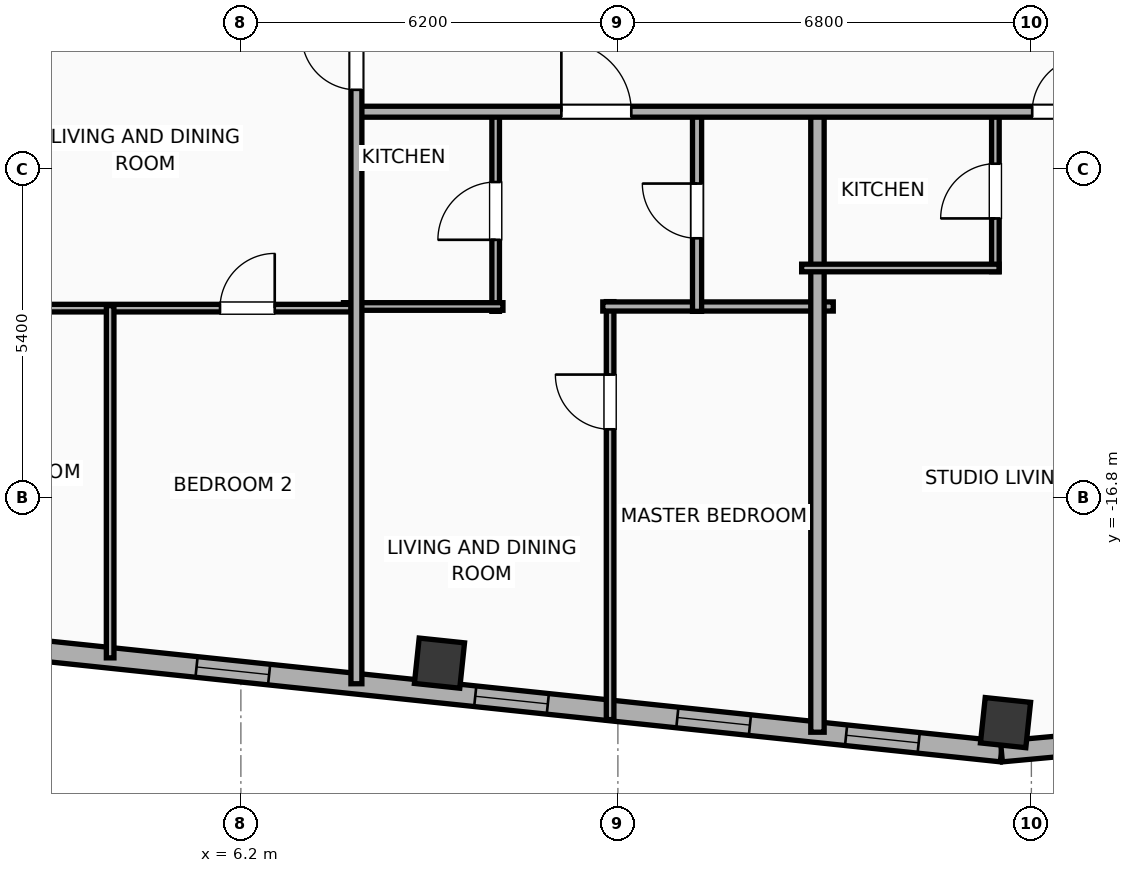
"""IFC4 building model, lengths in metres.
Left out: names, types, materials, properties, quantities, classifications, styles, units other than length and angle.
Written with IfcOpenShell. Run it as: python <this file> out.ifc"""

import sys

from ifc_helpers import new_model, si_unit, direction, frame, frame_2d, origin, origin_2d, place, context, subcontext, project, spatial, rectangle, hollow_rectangle, extrude, element, fill, save


model = new_model("IFC4")
c1 = context("Model", 3, precision=1e-05, world=origin(), true_north=direction((0.0, 1.0)))
c2 = subcontext(c1, "Body", "Model", "MODEL_VIEW")
j1 = project(units=[si_unit("LENGTHUNIT", "METRE"), si_unit("PLANEANGLEUNIT", "RADIAN")], contexts=[c1])
p1 = place(None, origin())
s1 = spatial("IfcSite", under=j1, at=p1, CompositionType="ELEMENT")
p2 = place(p1, origin())
s2 = spatial("IfcBuilding", under=s1, at=p2, CompositionType="ELEMENT")
p3 = place(p2, frame((0.0, 0.0, 302.9)))
s3 = spatial("IfcBuildingStorey", under=s2, at=p3, CompositionType="ELEMENT", Elevation=302.9)
for number, where, z_axis, x_axis in (
    (1, (9.466, -19.518, 0.0), (0.0, 0.0, 1.0), (0.995, -0.105, 0.0)),
    (2, (18.775, -20.497, 0.0), (0.0, 0.0, 1.0), (0.995, -0.105, 0.0)),
):
    element("IfcColumn", number, at=place(p3, frame(where, z_axis=z_axis, x_axis=x_axis)), inside=s3, PredefinedType="COLUMN", context=c2, shape_type="SweptSolid", body=[
        extrude(hollow_rectangle(XDim=0.75, YDim=0.75, WallThickness=0.025, at=origin_2d()), origin(), (0.0, 0.0, 1.0), 3.9),
    ])
p4 = place(p3, frame((18.708, -20.972, 0.0), z_axis=(0.0, 0.0, 1.0), x_axis=(-0.994521888554, 0.104528528102, 0.0)))
e3 = element("IfcWall", 3, at=p4, inside=s3, PredefinedType="ELEMENTEDWALL", context=c2, shape_type="SweptSolid", body=[
    extrude(rectangle(XDim=46.766, YDim=0.34, at=frame_2d((23.383, 0.0))), origin(), (0.0, 0.0, 1.0), 3.635),
])
p5 = place(p4, frame((23.733, 0.0, 0.65)))
e4 = element("IfcOpeningElement", 4, at=p5, cuts=e3, PredefinedType="OPENING", context=c2, shape_type="SweptSolid", body=[
    extrude(rectangle(XDim=2.6, YDim=2.45, at=frame_2d((1.3, 1.225))), frame((0.0, 0.18, 0.0), z_axis=(0.0, -1.0, 0.0), x_axis=(1.0, 0.0, 0.0)), (0.0, 0.0, 1.0), 0.36),
])
p6 = place(p4, frame((44.402, 0.0, 0.75)))
e5 = element("IfcOpeningElement", 5, at=p6, cuts=e3, PredefinedType="OPENING", context=c2, shape_type="SweptSolid", body=[
    extrude(rectangle(XDim=1.2, YDim=2.05, at=frame_2d((0.6, 1.025))), frame((0.0, 0.18, 0.0), z_axis=(0.0, -1.0, 0.0), x_axis=(1.0, 0.0, 0.0)), (0.0, 0.0, 1.0), 0.36),
])
p7 = place(p4, frame((39.54, 0.0, 0.75)))
e6 = element("IfcOpeningElement", 6, at=p7, cuts=e3, PredefinedType="OPENING", context=c2, shape_type="SweptSolid", body=[
    extrude(rectangle(XDim=1.2, YDim=2.05, at=frame_2d((0.6, 1.025))), frame((0.0, 0.18, 0.0), z_axis=(0.0, -1.0, 0.0), x_axis=(1.0, 0.0, 0.0)), (0.0, 0.0, 1.0), 0.36),
])
p8 = place(p4, frame((42.406, 0.0, 0.75)))
e7 = element("IfcOpeningElement", 7, at=p8, cuts=e3, PredefinedType="OPENING", context=c2, shape_type="SweptSolid", body=[
    extrude(rectangle(XDim=1.2, YDim=2.05, at=frame_2d((0.6, 1.025))), frame((0.0, 0.18, 0.0), z_axis=(0.0, -1.0, 0.0), x_axis=(1.0, 0.0, 0.0)), (0.0, 0.0, 1.0), 0.36),
])
p9 = place(p4, frame((34.933, 0.0, 0.75)))
e8 = element("IfcOpeningElement", 8, at=p9, cuts=e3, PredefinedType="OPENING", context=c2, shape_type="SweptSolid", body=[
    extrude(rectangle(XDim=1.2, YDim=2.05, at=frame_2d((0.6, 1.025))), frame((0.0, 0.18, 0.0), z_axis=(0.0, -1.0, 0.0), x_axis=(1.0, 0.0, 0.0)), (0.0, 0.0, 1.0), 0.36),
])
p10 = place(p4, frame((28.631, 0.0, 0.75)))
e9 = element("IfcOpeningElement", 9, at=p10, cuts=e3, PredefinedType="OPENING", context=c2, shape_type="SweptSolid", body=[
    extrude(rectangle(XDim=1.2, YDim=2.05, at=frame_2d((0.6, 1.025))), frame((0.0, 0.18, 0.0), z_axis=(0.0, -1.0, 0.0), x_axis=(1.0, 0.0, 0.0)), (0.0, 0.0, 1.0), 0.36),
])
p11 = place(p4, frame((30.896, 0.0, 0.75)))
e10 = element("IfcOpeningElement", 10, at=p11, cuts=e3, PredefinedType="OPENING", context=c2, shape_type="SweptSolid", body=[
    extrude(rectangle(XDim=1.2, YDim=2.05, at=frame_2d((0.6, 1.025))), frame((0.0, 0.18, 0.0), z_axis=(0.0, -1.0, 0.0), x_axis=(1.0, 0.0, 0.0)), (0.0, 0.0, 1.0), 0.36),
])
p12 = place(p4, frame((7.501, 0.0, 0.75)))
e11 = element("IfcOpeningElement", 11, at=p12, cuts=e3, PredefinedType="OPENING", context=c2, shape_type="SweptSolid", body=[
    extrude(rectangle(XDim=1.2, YDim=2.05, at=frame_2d((0.6, 1.025))), frame((0.0, 0.18, 0.0), z_axis=(0.0, -1.0, 0.0), x_axis=(1.0, 0.0, 0.0)), (0.0, 0.0, 1.0), 0.36),
])
p13 = place(p4, frame((4.159, 0.0, 0.75)))
e12 = element("IfcOpeningElement", 12, at=p13, cuts=e3, PredefinedType="OPENING", context=c2, shape_type="SweptSolid", body=[
    extrude(rectangle(XDim=1.2, YDim=2.05, at=frame_2d((0.6, 1.025))), frame((0.0, 0.18, 0.0), z_axis=(0.0, -1.0, 0.0), x_axis=(1.0, 0.0, 0.0)), (0.0, 0.0, 1.0), 0.36),
])
p14 = place(p4, frame((1.369, 0.0, 0.75)))
e13 = element("IfcOpeningElement", 13, at=p14, cuts=e3, PredefinedType="OPENING", context=c2, shape_type="SweptSolid", body=[
    extrude(rectangle(XDim=1.2, YDim=2.05, at=frame_2d((0.6, 1.025))), frame((0.0, 0.18, 0.0), z_axis=(0.0, -1.0, 0.0), x_axis=(1.0, 0.0, 0.0)), (0.0, 0.0, 1.0), 0.36),
])
p15 = place(p4, frame((20.254, 0.0, 0.75)))
e14 = element("IfcOpeningElement", 14, at=p15, cuts=e3, PredefinedType="OPENING", context=c2, shape_type="SweptSolid", body=[
    extrude(rectangle(XDim=1.2, YDim=2.05, at=frame_2d((0.6, 1.025))), frame((0.0, 0.18, 0.0), z_axis=(0.0, -1.0, 0.0), x_axis=(1.0, 0.0, 0.0)), (0.0, 0.0, 1.0), 0.36),
])
p16 = place(p4, frame((16.172, 0.0, 0.75)))
e15 = element("IfcOpeningElement", 15, at=p16, cuts=e3, PredefinedType="OPENING", context=c2, shape_type="SweptSolid", body=[
    extrude(rectangle(XDim=1.2, YDim=2.05, at=frame_2d((0.6, 1.025))), frame((0.0, 0.18, 0.0), z_axis=(0.0, -1.0, 0.0), x_axis=(1.0, 0.0, 0.0)), (0.0, 0.0, 1.0), 0.36),
])
p17 = place(p4, frame((12.11, 0.0, 0.75)))
e16 = element("IfcOpeningElement", 16, at=p17, cuts=e3, PredefinedType="OPENING", context=c2, shape_type="SweptSolid", body=[
    extrude(rectangle(XDim=1.2, YDim=2.05, at=frame_2d((0.6, 1.025))), frame((0.0, 0.18, 0.0), z_axis=(0.0, -1.0, 0.0), x_axis=(1.0, 0.0, 0.0)), (0.0, 0.0, 1.0), 0.36),
])
p18 = place(p3, frame((20.056, -20.848, 0.0), z_axis=(0.0, 0.0, 1.0), x_axis=(-0.995813013343, -0.091413579172, 0.0)))
e17 = element("IfcWall", 17, at=p18, inside=s3, PredefinedType="ELEMENTEDWALL", context=c2, shape_type="SweptSolid", body=[
    extrude(rectangle(XDim=1.354, YDim=0.34, at=frame_2d((0.677, 0.0))), origin(), (0.0, 0.0, 1.0), 3.635),
])
p19 = place(p3, frame((12.272, -20.447, 0.0), z_axis=(0.0, 0.0, 1.0), x_axis=(0.0, 1.0, 0.0)))
e18 = element("IfcWall", 18, at=p19, inside=s3, PredefinedType="PARTITIONING", context=c2, shape_type="SweptSolid", body=[
    extrude(rectangle(XDim=6.874, YDim=0.125, at=frame_2d((3.437, 0.0))), origin(), (0.0, 0.0, 1.0), 3.635),
])
p20 = place(p19, frame((4.774, 0.0, 0.0)))
e19 = element("IfcOpeningElement", 19, at=p20, cuts=e18, PredefinedType="OPENING", context=c2, shape_type="SweptSolid", body=[
    extrude(rectangle(XDim=0.9, YDim=2.05, at=frame_2d((0.45, 1.025))), frame((0.0, 0.073, 0.0), z_axis=(0.0, -1.0, 0.0), x_axis=(1.0, 0.0, 0.0)), (0.0, 0.0, 1.0), 0.145),
])
p21 = place(p3, frame((12.152, -13.653, 0.0), z_axis=(0.0, 0.0, 1.0), x_axis=(1.0, 0.0, 0.0)))
e20 = element("IfcWall", 20, at=p21, inside=s3, PredefinedType="PLUMBINGWALL", context=c2, shape_type="SweptSolid", body=[
    extrude(rectangle(XDim=3.79, YDim=0.15, at=frame_2d((1.895, 0.0))), origin(), (0.0, 0.0, 1.0), 3.635),
])
p22 = place(p3, frame((10.39, -13.733, 0.0), z_axis=(0.0, 0.0, 1.0), x_axis=(0.0, 1.0, 0.0)))
e21 = element("IfcWall", 21, at=p22, inside=s3, PredefinedType="PARTITIONING", context=c2, shape_type="SweptSolid", body=[
    extrude(rectangle(XDim=3.303, YDim=0.125, at=frame_2d((1.651, 0.0))), origin(), (0.0, 0.0, 1.0), 3.635),
])
p23 = place(p22, frame((1.177, 0.0, 0.0)))
e22 = element("IfcOpeningElement", 22, at=p23, cuts=e21, PredefinedType="OPENING", context=c2, shape_type="SweptSolid", body=[
    extrude(rectangle(XDim=0.95, YDim=2.05, at=frame_2d((0.475, 1.025))), frame((0.0, 0.073, 0.0), z_axis=(0.0, -1.0, 0.0), x_axis=(1.0, 0.0, 0.0)), (0.0, 0.0, 1.0), 0.145),
])
p24 = place(p3, frame((7.887, -13.653, 0.0), z_axis=(0.0, 0.0, 1.0), x_axis=(1.0, 0.0, 0.0)))
e23 = element("IfcWall", 23, at=p24, inside=s3, PredefinedType="PARTITIONING", context=c2, shape_type="SweptSolid", body=[
    extrude(rectangle(XDim=2.623, YDim=0.125, at=frame_2d((1.311, 0.0))), origin(), (0.0, 0.0, 1.0), 3.635),
])
p25 = place(p3, frame((13.702, -13.733, 0.0), z_axis=(0.0, 0.0, 1.0), x_axis=(0.0, 1.0, 0.0)))
e24 = element("IfcWall", 24, at=p25, inside=s3, PredefinedType="PLUMBINGWALL", context=c2, shape_type="SweptSolid", body=[
    extrude(rectangle(XDim=3.303, YDim=0.15, at=frame_2d((1.651, 0.0))), origin(), (0.0, 0.0, 1.0), 3.635),
])
p26 = place(p25, frame((1.201, 0.0, 0.0)))
e25 = element("IfcOpeningElement", 25, at=p26, cuts=e24, PredefinedType="OPENING", context=c2, shape_type="SweptSolid", body=[
    extrude(rectangle(XDim=0.9, YDim=2.05, at=frame_2d((0.45, 1.025))), frame((0.0, 0.085, 0.0), z_axis=(0.0, -1.0, 0.0), x_axis=(1.0, 0.0, 0.0)), (0.0, 0.0, 1.0), 0.17),
])
p27 = place(p3, frame((15.682, -20.654, 0.0), z_axis=(0.0, 0.0, 1.0), x_axis=(0.0, 1.0, 0.0)))
e26 = element("IfcWall", 26, at=p27, inside=s3, PredefinedType="PARTITIONING", context=c2, shape_type="SweptSolid", body=[
    extrude(rectangle(XDim=10.284, YDim=0.22, at=frame_2d((5.142, 0.0))), origin(), (0.0, 0.0, 1.0), 3.635),
])
p28 = place(p3, frame((18.608, -13.08, 0.0), z_axis=(0.0, 0.0, 1.0), x_axis=(0.0, 1.0, 0.0)))
e27 = element("IfcWall", 27, at=p28, inside=s3, PredefinedType="PARTITIONING", context=c2, shape_type="SweptSolid", body=[
    extrude(rectangle(XDim=2.65, YDim=0.125, at=frame_2d((1.325, 0.0))), origin(), (0.0, 0.0, 1.0), 3.635),
])
p29 = place(p28, frame((0.875, 0.0, 0.0)))
e28 = element("IfcOpeningElement", 28, at=p29, cuts=e27, PredefinedType="OPENING", context=c2, shape_type="SweptSolid", body=[
    extrude(rectangle(XDim=0.9, YDim=2.05, at=frame_2d((0.45, 1.025))), frame((0.0, 0.073, 0.0), z_axis=(0.0, -1.0, 0.0), x_axis=(1.0, 0.0, 0.0)), (0.0, 0.0, 1.0), 0.145),
])
p30 = place(p3, frame((15.422, -13.02, 0.0), z_axis=(0.0, 0.0, 1.0), x_axis=(1.0, 0.0, 0.0)))
e29 = element("IfcWall", 29, at=p30, inside=s3, PredefinedType="PARTITIONING", context=c2, shape_type="SweptSolid", body=[
    extrude(rectangle(XDim=3.246, YDim=0.125, at=frame_2d((1.623, 0.0))), origin(), (0.0, 0.0, 1.0), 3.635),
])
p31 = place(p3, frame((8.08, -10.45, 0.0), z_axis=(0.0, 0.0, 1.0), x_axis=(1.0, 0.0, 0.0)))
e30 = element("IfcWall", 30, at=p31, inside=s3, PredefinedType="PARTITIONING", context=c2, shape_type="SweptSolid", body=[
    extrude(rectangle(XDim=15.199, YDim=0.18, at=frame_2d((7.6, 0.0))), origin(), (0.0, 0.0, 1.0), 3.635),
])
p32 = place(p31, frame((3.39, 0.0, 0.0)))
e31 = element("IfcOpeningElement", 31, at=p32, cuts=e30, PredefinedType="OPENING", context=c2, shape_type="SweptSolid", body=[
    extrude(rectangle(XDim=1.15, YDim=2.05, at=frame_2d((0.575, 1.025))), frame((0.0, 0.1, 0.0), z_axis=(0.0, -1.0, 0.0), x_axis=(1.0, 0.0, 0.0)), (0.0, 0.0, 1.0), 0.2),
])
p33 = place(p31, frame((11.134, 0.0, 0.0)))
e32 = element("IfcOpeningElement", 32, at=p33, cuts=e30, PredefinedType="OPENING", context=c2, shape_type="SweptSolid", body=[
    extrude(rectangle(XDim=0.9, YDim=2.05, at=frame_2d((0.45, 1.025))), frame((0.0, 0.1, 0.0), z_axis=(0.0, -1.0, 0.0), x_axis=(1.0, 0.0, 0.0)), (0.0, 0.0, 1.0), 0.2),
])
p34 = place(p3, frame((0.02, -13.68, 0.0), z_axis=(0.0, 0.0, 1.0), x_axis=(1.0, 0.0, 0.0)))
e33 = element("IfcWall", 33, at=p34, inside=s3, PredefinedType="PARTITIONING", context=c2, shape_type="SweptSolid", body=[
    extrude(rectangle(XDim=7.992, YDim=0.125, at=frame_2d((3.996, 0.0))), origin(), (0.0, 0.0, 1.0), 3.635),
])
p35 = place(p34, frame((1.323, 0.0, 0.0)))
e34 = element("IfcOpeningElement", 34, at=p35, cuts=e33, PredefinedType="OPENING", context=c2, shape_type="SweptSolid", body=[
    extrude(rectangle(XDim=0.9, YDim=2.05, at=frame_2d((0.45, 1.025))), frame((0.0, 0.073, 0.0), z_axis=(0.0, -1.0, 0.0), x_axis=(1.0, 0.0, 0.0)), (0.0, 0.0, 1.0), 0.145),
])
p36 = place(p34, frame((5.837, 0.0, 0.0)))
e35 = element("IfcOpeningElement", 35, at=p36, cuts=e33, PredefinedType="OPENING", context=c2, shape_type="SweptSolid", body=[
    extrude(rectangle(XDim=0.9, YDim=2.05, at=frame_2d((0.45, 1.025))), frame((0.0, 0.073, 0.0), z_axis=(0.0, -1.0, 0.0), x_axis=(1.0, 0.0, 0.0)), (0.0, 0.0, 1.0), 0.145),
])
p37 = place(p3, frame((4.05, -19.432, 0.0), z_axis=(0.0, 0.0, 1.0), x_axis=(0.0, 1.0, 0.0)))
e36 = element("IfcWall", 36, at=p37, inside=s3, PredefinedType="PARTITIONING", context=c2, shape_type="SweptSolid", body=[
    extrude(rectangle(XDim=5.792, YDim=0.125, at=frame_2d((2.896, 0.0))), origin(), (0.0, 0.0, 1.0), 3.635),
])
p38 = place(p3, frame((8.1, -19.857, 0.0), z_axis=(0.0, 0.0, 1.0), x_axis=(0.0, 1.0, 0.0)))
e37 = element("IfcWall", 37, at=p38, inside=s3, PredefinedType="PARTITIONING", context=c2, shape_type="SweptSolid", body=[
    extrude(rectangle(XDim=11.017, YDim=0.18, at=frame_2d((5.509, 0.0))), origin(), (0.0, 0.0, 1.0), 3.635),
])
p39 = place(p38, frame((9.767, 0.0, 0.0)))
e38 = element("IfcOpeningElement", 38, at=p39, cuts=e37, PredefinedType="OPENING", context=c2, shape_type="SweptSolid", body=[
    extrude(rectangle(XDim=0.9, YDim=2.05, at=frame_2d((0.45, 1.025))), frame((0.0, 0.1, 0.0), z_axis=(0.0, -1.0, 0.0), x_axis=(1.0, 0.0, 0.0)), (0.0, 0.0, 1.0), 0.2),
])
p40 = place(p12, origin())
e39 = element("IfcWindow", 39, at=p40, inside=s3, PartitioningType="SINGLE_PANEL", PredefinedType="WINDOW", context=c2, shape_type="SweptSolid", body=[
    extrude(rectangle(XDim=1.2, YDim=2.05, at=frame_2d((0.6, 1.025))), frame((0.0, 0.03, 0.0), z_axis=(0.0, -1.0, 0.0), x_axis=(1.0, 0.0, 0.0)), (0.0, 0.0, 1.0), 0.06),
])
fill(e11, e39)
p41 = place(p13, origin())
e40 = element("IfcWindow", 40, at=p41, inside=s3, PartitioningType="SINGLE_PANEL", PredefinedType="WINDOW", context=c2, shape_type="SweptSolid", body=[
    extrude(rectangle(XDim=1.2, YDim=2.05, at=frame_2d((0.6, 1.025))), frame((0.0, 0.03, 0.0), z_axis=(0.0, -1.0, 0.0), x_axis=(1.0, 0.0, 0.0)), (0.0, 0.0, 1.0), 0.06),
])
fill(e12, e40)
p42 = place(p14, origin())
e41 = element("IfcWindow", 41, at=p42, inside=s3, PartitioningType="SINGLE_PANEL", PredefinedType="WINDOW", context=c2, shape_type="SweptSolid", body=[
    extrude(rectangle(XDim=1.2, YDim=2.05, at=frame_2d((0.6, 1.025))), frame((0.0, 0.03, 0.0), z_axis=(0.0, -1.0, 0.0), x_axis=(1.0, 0.0, 0.0)), (0.0, 0.0, 1.0), 0.06),
])
fill(e13, e41)
p43 = place(p17, origin())
e42 = element("IfcWindow", 42, at=p43, inside=s3, PartitioningType="SINGLE_PANEL", PredefinedType="WINDOW", context=c2, shape_type="SweptSolid", body=[
    extrude(rectangle(XDim=1.2, YDim=2.05, at=frame_2d((0.6, 1.025))), frame((0.0, 0.03, 0.0), z_axis=(0.0, -1.0, 0.0), x_axis=(1.0, 0.0, 0.0)), (0.0, 0.0, 1.0), 0.06),
])
fill(e16, e42)
p44 = place(p20, origin())
e43 = element("IfcDoor", 43, at=p44, inside=s3, OperationType="SINGLE_SWING_RIGHT", PredefinedType="DOOR", context=c2, shape_type="SweptSolid", body=[
    extrude(rectangle(XDim=0.9, YDim=2.05, at=frame_2d((0.45, 1.025))), frame((0.0, 0.025, 0.0), z_axis=(0.0, -1.0, 0.0), x_axis=(1.0, 0.0, 0.0)), (0.0, 0.0, 1.0), 0.05),
])
fill(e19, e43)
p45 = place(p23, origin())
e44 = element("IfcDoor", 44, at=p45, inside=s3, OperationType="SINGLE_SWING_LEFT", PredefinedType="DOOR", context=c2, shape_type="SweptSolid", body=[
    extrude(rectangle(XDim=0.95, YDim=2.05, at=frame_2d((0.475, 1.025))), frame((0.0, 0.025, 0.0), z_axis=(0.0, -1.0, 0.0), x_axis=(1.0, 0.0, 0.0)), (0.0, 0.0, 1.0), 0.05),
])
fill(e22, e44)
p46 = place(p26, origin())
e45 = element("IfcDoor", 45, at=p46, inside=s3, OperationType="SINGLE_SWING_RIGHT", PredefinedType="DOOR", context=c2, shape_type="SweptSolid", body=[
    extrude(rectangle(XDim=0.9, YDim=2.05, at=frame_2d((0.45, 1.025))), frame((0.0, 0.025, 0.0), z_axis=(0.0, -1.0, 0.0), x_axis=(1.0, 0.0, 0.0)), (0.0, 0.0, 1.0), 0.05),
])
fill(e25, e45)
p47 = place(p29, origin())
e46 = element("IfcDoor", 46, at=p47, inside=s3, OperationType="SINGLE_SWING_LEFT", PredefinedType="DOOR", context=c2, shape_type="SweptSolid", body=[
    extrude(rectangle(XDim=0.9, YDim=2.05, at=frame_2d((0.45, 1.025))), frame((0.0, 0.025, 0.0), z_axis=(0.0, -1.0, 0.0), x_axis=(1.0, 0.0, 0.0)), (0.0, 0.0, 1.0), 0.05),
])
fill(e28, e46)
p48 = place(p32, origin())
e47 = element("IfcDoor", 47, at=p48, inside=s3, OperationType="SINGLE_SWING_LEFT", PredefinedType="DOOR", context=c2, shape_type="SweptSolid", body=[
    extrude(rectangle(XDim=1.15, YDim=2.05, at=frame_2d((0.575, 1.025))), frame((0.0, 0.025, 0.0), z_axis=(0.0, -1.0, 0.0), x_axis=(1.0, 0.0, 0.0)), (0.0, 0.0, 1.0), 0.05),
])
fill(e31, e47)
p49 = place(p33, origin())
e48 = element("IfcDoor", 48, at=p49, inside=s3, OperationType="SINGLE_SWING_RIGHT", PredefinedType="DOOR", context=c2, shape_type="SweptSolid", body=[
    extrude(rectangle(XDim=0.9, YDim=2.05, at=frame_2d((0.45, 1.025))), frame((0.0, 0.025, 0.0), z_axis=(0.0, -1.0, 0.0), x_axis=(1.0, 0.0, 0.0)), (0.0, 0.0, 1.0), 0.05),
])
fill(e32, e48)
p50 = place(p36, origin())
e49 = element("IfcDoor", 49, at=p50, inside=s3, OperationType="SINGLE_SWING_RIGHT", PredefinedType="DOOR", context=c2, shape_type="SweptSolid", body=[
    extrude(rectangle(XDim=0.9, YDim=2.05, at=frame_2d((0.45, 1.025))), frame((0.0, 0.025, 0.0), z_axis=(0.0, -1.0, 0.0), x_axis=(1.0, 0.0, 0.0)), (0.0, 0.0, 1.0), 0.05),
])
fill(e35, e49)
p51 = place(p39, origin())
e50 = element("IfcDoor", 50, at=p51, inside=s3, OperationType="SINGLE_SWING_RIGHT", PredefinedType="DOOR", context=c2, shape_type="SweptSolid", body=[
    extrude(rectangle(XDim=0.9, YDim=2.05, at=frame_2d((0.45, 1.025))), frame((0.0, 0.025, 0.0), z_axis=(0.0, -1.0, 0.0), x_axis=(1.0, 0.0, 0.0)), (0.0, 0.0, 1.0), 0.05),
])
fill(e38, e50)
save(model, sys.argv[1])
